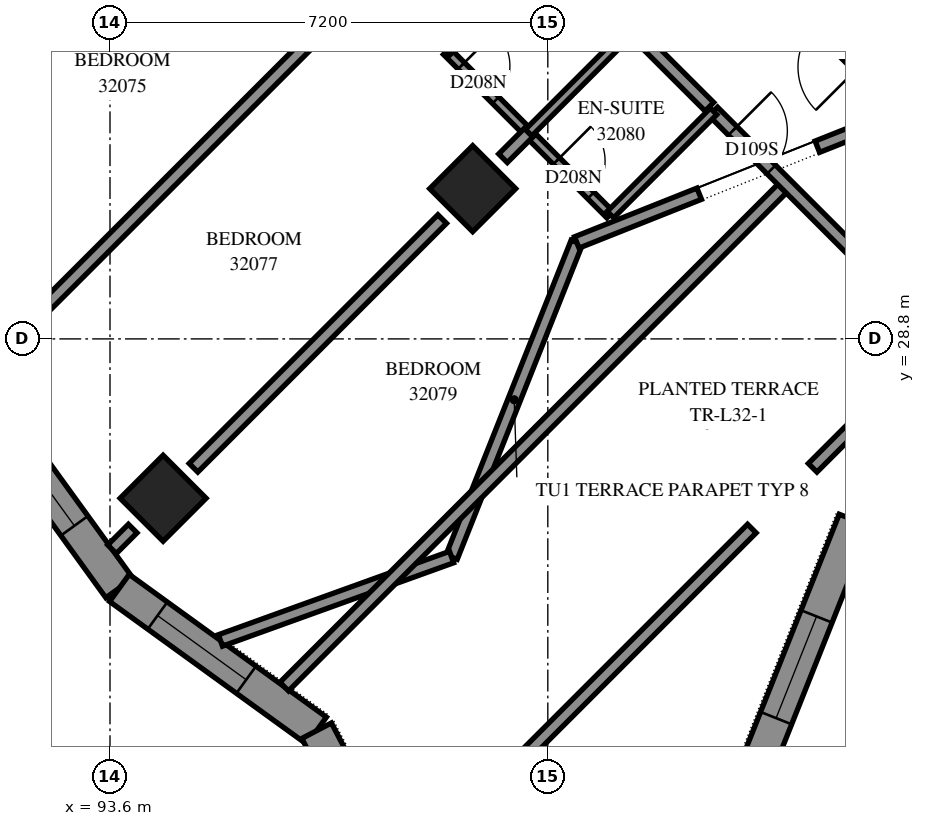
"""IFC4 building model, lengths in metres.
Left out: names, types, materials, properties, quantities, classifications, styles, units other than length and angle.
Written with IfcOpenShell. Run it as: python <this file> out.ifc"""

import sys

from ifc_helpers import new_model, si_unit, direction, frame, frame_2d, origin, origin_2d, place, context, subcontext, project, spatial, polyline, rectangle, outline, extrude, element, fill, save


model = new_model("IFC4")
c1 = context("Model", 3, precision=1e-05, world=origin(), true_north=direction((0.0, 1.0)))
c2 = subcontext(c1, "Body", "Model", "MODEL_VIEW")
j1 = project(units=[si_unit("LENGTHUNIT", "METRE"), si_unit("PLANEANGLEUNIT", "RADIAN")], contexts=[c1])
p1 = place(None, origin())
s1 = spatial("IfcSite", under=j1, at=p1, CompositionType="ELEMENT")
p2 = place(p1, origin())
s2 = spatial("IfcBuilding", under=s1, at=p2, CompositionType="ELEMENT")
p3 = place(p2, frame((0.0, 0.0, 118.6)))
s3 = spatial("IfcBuildingStorey", under=s2, at=p3, CompositionType="ELEMENT", Elevation=118.6)
for number, where, z_axis, x_axis in (
    (1, (99.565, 31.271, 0.0), (0.0, 0.0, 1.0), (0.707, -0.707, 0.0)),
    (2, (94.474, 26.18, 0.0), (0.0, 0.0, 1.0), (0.707, -0.707, 0.0)),
):
    element("IfcColumn", number, at=place(p3, frame(where, z_axis=z_axis, x_axis=x_axis)), inside=s3, PredefinedType="COLUMN", context=c2, shape_type="SweptSolid", body=[
        extrude(rectangle(XDim=1.0, YDim=1.0, at=origin_2d()), origin(), (0.0, 0.0, 1.0), 3.1),
    ])
p4 = place(p3, frame((103.794, 20.653, 0.0), z_axis=(0.0, 0.0, 1.0), x_axis=(0.3696863302, 0.9291566161, 0.0)))
e3 = element("IfcWall", 3, at=p4, inside=s3, PredefinedType="SOLIDWALL", context=c2, shape_type="SweptSolid", body=[
    extrude(outline(polyline([(-0.124, -0.275), (5.437, -0.275), (5.674, 0.275), (0.124, 0.275), (-0.124, -0.275)])), origin(), (0.0, 0.0, 1.0), 3.1),
])
p5 = place(p4, frame((2.057, 0.0, 0.7)))
e4 = element("IfcOpeningElement", 4, at=p5, cuts=e3, PredefinedType="OPENING", context=c2, shape_type="SweptSolid", body=[
    extrude(rectangle(XDim=1.8, YDim=2.0, at=frame_2d((0.9, 1.0))), frame((0.0, 0.285, 0.0), z_axis=(0.0, -1.0, 0.0), x_axis=(1.0, 0.0, 0.0)), (0.0, 0.0, 1.0), 0.57),
])
p6 = place(p3, frame((105.848, 25.815, 0.0), z_axis=(0.0, 0.0, 1.0), x_axis=(0.9291504333, 0.3697018694, 0.0)))
e5 = element("IfcWall", 5, at=p6, inside=s3, PredefinedType="SOLIDWALL", context=c2, shape_type="SweptSolid", body=[
    extrude(outline(polyline([(0.118, -0.275), (5.68, -0.275), (5.432, 0.275), (-0.118, 0.275), (0.118, -0.275)])), origin(), (0.0, 0.0, 1.0), 3.1),
])
p7 = place(p6, frame((0.358, 0.0, 0.7)))
e6 = element("IfcOpeningElement", 6, at=p7, cuts=e5, PredefinedType="OPENING", context=c2, shape_type="SweptSolid", body=[
    extrude(rectangle(XDim=1.8, YDim=2.0, at=frame_2d((0.9, 1.0))), frame((0.0, 0.285, 0.0), z_axis=(0.0, -1.0, 0.0), x_axis=(1.0, 0.0, 0.0)), (0.0, 0.0, 1.0), 0.57),
])
p8 = place(p6, frame((2.874, 0.0, 0.7)))
e7 = element("IfcOpeningElement", 7, at=p8, cuts=e5, PredefinedType="OPENING", context=c2, shape_type="SweptSolid", body=[
    extrude(rectangle(XDim=1.8, YDim=2.0, at=frame_2d((0.9, 1.0))), frame((0.0, 0.285, 0.0), z_axis=(0.0, -1.0, 0.0), x_axis=(1.0, 0.0, 0.0)), (0.0, 0.0, 1.0), 0.57),
])
p9 = place(p3, frame((91.42, 27.93, 0.0), z_axis=(0.0, 0.0, 1.0), x_axis=(0.5863428119, -0.8100630266, 0.0)))
e8 = element("IfcWall", 8, at=p9, inside=s3, PredefinedType="SOLIDWALL", context=c2, shape_type="SweptSolid", body=[
    extrude(outline(polyline([(0.044, -0.275), (4.027, -0.275), (3.939, 0.275), (-0.044, 0.275), (0.044, -0.275)])), origin(), (0.0, 0.0, 1.0), 3.1),
])
p10 = place(p9, frame((0.92, 0.0, 0.7)))
e9 = element("IfcOpeningElement", 9, at=p10, cuts=e8, PredefinedType="OPENING", context=c2, shape_type="SweptSolid", body=[
    extrude(rectangle(XDim=1.8, YDim=2.0, at=frame_2d((0.9, 1.0))), frame((0.0, 0.285, 0.0), z_axis=(0.0, -1.0, 0.0), x_axis=(1.0, 0.0, 0.0)), (0.0, 0.0, 1.0), 0.57),
])
p11 = place(p3, frame((93.755, 24.704, 0.0), z_axis=(0.0, 0.0, 1.0), x_axis=(0.8100529974, -0.5863566673, 0.0)))
e10 = element("IfcWall", 10, at=p11, inside=s3, PredefinedType="SOLIDWALL", context=c2, shape_type="SweptSolid", body=[
    extrude(outline(polyline([(-0.044, -0.275), (3.939, -0.275), (4.068, 0.275), (0.044, 0.275), (-0.044, -0.275)])), origin(), (0.0, 0.0, 1.0), 3.1),
])
p12 = place(p11, frame((0.774, 0.0, 0.7)))
e11 = element("IfcOpeningElement", 11, at=p12, cuts=e10, PredefinedType="OPENING", context=c2, shape_type="SweptSolid", body=[
    extrude(rectangle(XDim=1.8, YDim=2.0, at=frame_2d((0.9, 1.0))), frame((0.0, 0.285, 0.0), z_axis=(0.0, -1.0, 0.0), x_axis=(1.0, 0.0, 0.0)), (0.0, 0.0, 1.0), 0.57),
])
p13 = place(p3, frame((96.998, 22.357, 0.0), z_axis=(0.0, 0.0, 1.0), x_axis=(0.4637843995, -0.8859480971, 0.0)))
e12 = element("IfcWall", 12, at=p13, inside=s3, PredefinedType="SOLIDWALL", context=c2, shape_type="SweptSolid", body=[
    extrude(outline(polyline([(0.065, -0.275), (4.185, -0.275), (3.705, 0.275), (-0.065, 0.275), (0.065, -0.275)])), origin(), (0.0, 0.0, 1.0), 3.1),
])
p14 = place(p13, frame((0.621, 0.0, 0.7)))
e13 = element("IfcOpeningElement", 13, at=p14, cuts=e12, PredefinedType="OPENING", context=c2, shape_type="SweptSolid", body=[
    extrude(rectangle(XDim=1.8, YDim=2.0, at=frame_2d((0.9, 1.0))), frame((0.0, 0.285, 0.0), z_axis=(0.0, -1.0, 0.0), x_axis=(1.0, 0.0, 0.0)), (0.0, 0.0, 1.0), 0.57),
])
p15 = place(p3, frame((101.276, 30.386, 0.0), z_axis=(0.0, 0.0, 1.0), x_axis=(-0.3696934536, -0.9291537819, 0.0)))
e14 = element("IfcWall", 14, at=p15, inside=s3, PredefinedType="PARAPET", context=c2, shape_type="SweptSolid", body=[
    extrude(outline(polyline([(-0.043, -0.1), (5.524, -0.1), (5.614, 0.1), (0.043, 0.1), (-0.043, -0.1)])), origin(), (0.0, 0.0, 1.0), 0.25),
])
p16 = place(p3, frame((99.218, 25.212, 0.0), z_axis=(0.0, 0.0, 1.0), x_axis=(-0.9406904075, -0.3392662042, 0.0)))
e15 = element("IfcWall", 15, at=p16, inside=s3, PredefinedType="PARAPET", context=c2, shape_type="SweptSolid", body=[
    extrude(outline(polyline([(0.045, -0.1), (4.041, -0.1), (4.041, 0.1), (-0.045, 0.1), (0.045, -0.1)])), origin(), (0.0, 0.0, 1.0), 0.25),
])
p17 = place(p3, frame((96.465, 23.082, 0.0), z_axis=(0.0, 0.0, 1.0), x_axis=(0.707016895, 0.7071966559, 0.0)))
e16 = element("IfcWall", 16, at=p17, inside=s3, PredefinedType="PARTITIONING", context=c2, shape_type="SweptSolid", body=[
    extrude(rectangle(XDim=11.682, YDim=0.2, at=frame_2d((5.841, 0.0))), origin(), (0.0, 0.0, 1.0), 3.1),
])
p18 = place(p3, frame((86.329, 33.31, 0.0), z_axis=(0.0, 0.0, 1.0), x_axis=(0.7071067812, 0.7071067812, 0.0)))
e17 = element("IfcWall", 17, at=p18, inside=s3, PredefinedType="PARTITIONING", context=c2, shape_type="SweptSolid", body=[
    extrude(rectangle(XDim=11.617, YDim=0.2, at=frame_2d((5.808, 0.0))), origin(), (0.0, 0.0, 1.0), 3.1),
])
p19 = place(p3, frame((91.45, 28.248, 0.0), z_axis=(0.0, 0.0, 1.0), x_axis=(0.7071931644, 0.7070203875, 0.0)))
e18 = element("IfcWall", 18, at=p19, inside=s3, PredefinedType="PARTITIONING", context=c2, shape_type="SweptSolid", body=[
    extrude(rectangle(XDim=11.576, YDim=0.2, at=frame_2d((5.788, 0.0))), origin(), (0.0, 0.0, 1.0), 3.1),
])
p20 = place(p3, frame((108.831, 30.355, 0.0), z_axis=(0.0, 0.0, 1.0), x_axis=(-0.7073012053, 0.7069123036, 0.0)))
e19 = element("IfcWall", 19, at=p20, inside=s3, PredefinedType="PARTITIONING", context=c2, shape_type="SweptSolid", body=[
    extrude(rectangle(XDim=7.2, YDim=0.2, at=frame_2d((3.6, 0.0))), origin(), (0.0, 0.0, 1.0), 3.1),
])
p21 = place(p20, frame((4.125, 0.0, 0.0)))
e20 = element("IfcOpeningElement", 20, at=p21, cuts=e19, PredefinedType="OPENING", context=c2, shape_type="SweptSolid", body=[
    extrude(rectangle(XDim=1.0, YDim=2.1, at=frame_2d((0.5, 1.05))), frame((0.0, 0.11, 0.0), z_axis=(0.0, -1.0, 0.0), x_axis=(1.0, 0.0, 0.0)), (0.0, 0.0, 1.0), 0.22),
])
p22 = place(p20, frame((0.705, 0.0, 0.0)))
e21 = element("IfcOpeningElement", 21, at=p22, cuts=e19, PredefinedType="OPENING", context=c2, shape_type="SweptSolid", body=[
    extrude(rectangle(XDim=0.9, YDim=2.1, at=frame_2d((0.45, 1.05))), frame((0.0, 0.11, 0.0), z_axis=(0.0, -1.0, 0.0), x_axis=(1.0, 0.0, 0.0)), (0.0, 0.0, 1.0), 0.22),
])
for number, where, z_axis, x_axis in (
    (22, (89.881, 31.771, 0.0), (0.0, 0.0, 1.0), (0.707, 0.707, 0.0)),
    (23, (100.063, 21.589, 0.0), (0.0, 0.0, 1.0), (0.707, 0.707, 0.0)),
):
    element("IfcWall", number, at=place(p3, frame(where, z_axis=z_axis, x_axis=x_axis)), inside=s3, PredefinedType="PARTITIONING", context=c2, shape_type="SweptSolid", body=[
        extrude(rectangle(XDim=5.787, YDim=0.2, at=frame_2d((2.893, 0.0))), origin(), (0.0, 0.0, 1.0), 3.1),
    ])
p23 = place(p3, frame((94.973, 26.681, 0.0), z_axis=(0.0, 0.0, 1.0), x_axis=(0.7071067812, 0.7071067812, 0.0)))
e24 = element("IfcWall", 24, at=p23, inside=s3, PredefinedType="PARTITIONING", context=c2, shape_type="SweptSolid", body=[
    extrude(rectangle(XDim=5.784, YDim=0.2, at=frame_2d((2.892, 0.0))), origin(), (0.0, 0.0, 1.0), 2.6),
])
p24 = place(p3, frame((103.521, 32.541, 0.0), z_axis=(0.0, 0.0, 1.0), x_axis=(0.7071067812, -0.7071067812, 0.0)))
e25 = element("IfcWall", 25, at=p24, inside=s3, PredefinedType="PARTITIONING", context=c2, shape_type="SweptSolid", body=[
    extrude(rectangle(XDim=5.301, YDim=0.2, at=frame_2d((2.65, 0.0))), origin(), (0.0, 0.0, 1.0), 3.1),
])
p25 = place(p24, frame((0.451, 0.0, 0.0)))
e26 = element("IfcOpeningElement", 26, at=p25, cuts=e25, PredefinedType="OPENING", context=c2, shape_type="SweptSolid", body=[
    extrude(rectangle(XDim=0.9, YDim=2.1, at=frame_2d((0.45, 1.05))), frame((0.0, 0.11, 0.0), z_axis=(0.0, -1.0, 0.0), x_axis=(1.0, 0.0, 0.0)), (0.0, 0.0, 1.0), 0.22),
])
p26 = place(p3, frame((99.137, 33.531, 0.0), z_axis=(0.0, 0.0, 1.0), x_axis=(0.7071067812, -0.7071067812, 0.0)))
e27 = element("IfcWall", 27, at=p26, inside=s3, PredefinedType="PARTITIONING", context=c2, shape_type="SweptSolid", body=[
    extrude(rectangle(XDim=3.801, YDim=0.15, at=frame_2d((1.901, 0.0))), origin(), (0.0, 0.0, 1.0), 3.1),
])
p27 = place(p26, frame((0.339, 0.0, 0.0)))
e28 = element("IfcOpeningElement", 28, at=p27, cuts=e27, PredefinedType="OPENING", context=c2, shape_type="SweptSolid", body=[
    extrude(rectangle(XDim=0.8, YDim=2.1, at=frame_2d((0.4, 1.05))), frame((0.0, 0.085, 0.0), z_axis=(0.0, -1.0, 0.0), x_axis=(1.0, 0.0, 0.0)), (0.0, 0.0, 1.0), 0.17),
])
p28 = place(p26, frame((2.553, 0.0, 0.0)))
e29 = element("IfcOpeningElement", 29, at=p28, cuts=e27, PredefinedType="OPENING", context=c2, shape_type="SweptSolid", body=[
    extrude(rectangle(XDim=0.8, YDim=2.1, at=frame_2d((0.4, 1.05))), frame((0.0, 0.085, 0.0), z_axis=(0.0, -1.0, 0.0), x_axis=(1.0, 0.0, 0.0)), (0.0, 0.0, 1.0), 0.17),
])
p29 = place(p3, frame((105.155, 26.681, 0.0), z_axis=(0.0, 0.0, 1.0), x_axis=(0.7071067812, 0.7071067812, 0.0)))
e30 = element("IfcWall", 30, at=p29, inside=s3, PredefinedType="PARTITIONING", context=c2, shape_type="SweptSolid", body=[
    extrude(rectangle(XDim=2.993, YDim=0.2, at=frame_2d((1.496, 0.0))), origin(), (0.0, 0.0, 1.0), 3.1),
])
for number, where, z_axis, x_axis in (
    (31, (99.143, 33.531, 0.0), (0.0, 0.0, 1.0), (0.708, 0.707, 0.0)),
    (32, (101.83, 30.844, 0.0), (0.0, 0.0, 1.0), (0.707, 0.708, 0.0)),
):
    element("IfcWall", number, at=place(p3, frame(where, z_axis=z_axis, x_axis=x_axis)), inside=s3, PredefinedType="PARTITIONING", context=c2, shape_type="SweptSolid", body=[
        extrude(rectangle(XDim=2.4, YDim=0.15, at=frame_2d((1.2, 0.0))), origin(), (0.0, 0.0, 1.0), 3.1),
    ])
p30 = place(p3, frame((100.483, 32.191, 0.0), z_axis=(0.0, 0.0, 1.0), x_axis=(0.7071067812, 0.7071067812, 0.0)))
e33 = element("IfcWall", 33, at=p30, inside=s3, PredefinedType="PARTITIONING", context=c2, shape_type="SweptSolid", body=[
    extrude(rectangle(XDim=2.398, YDim=0.15, at=frame_2d((1.199, 0.0))), origin(), (0.0, 0.0, 1.0), 2.6),
])
p31 = place(p3, frame((102.183, 33.889, 0.0), z_axis=(0.0, 0.0, 1.0), x_axis=(0.7076620277, -0.7065510983, 0.0)))
e34 = element("IfcWall", 34, at=p31, inside=s3, PredefinedType="PARTITIONING", context=c2, shape_type="SweptSolid", body=[
    extrude(rectangle(XDim=1.8, YDim=0.2, at=frame_2d((0.9, 0.0))), origin(), (0.0, 0.0, 1.0), 3.1),
])
p32 = place(p3, frame((100.063, 31.771, 0.0), z_axis=(0.0, 0.0, 1.0), x_axis=(0.7071067812, 0.7071067812, 0.0)))
e35 = element("IfcWall", 35, at=p32, inside=s3, PredefinedType="PARTITIONING", context=c2, shape_type="SweptSolid", body=[
    extrude(rectangle(XDim=0.594, YDim=0.2, at=frame_2d((0.297, 0.0))), origin(), (0.0, 0.0, 1.0), 2.6),
])
p33 = place(p3, frame((93.633, 25.341, 0.0), z_axis=(0.0, 0.0, 1.0), x_axis=(0.7071067812, 0.7071067812, 0.0)))
e36 = element("IfcWall", 36, at=p33, inside=s3, PredefinedType="PARTITIONING", context=c2, shape_type="SweptSolid", body=[
    extrude(rectangle(XDim=0.481, YDim=0.2, at=frame_2d((0.24, 0.0))), origin(), (0.0, 0.0, 1.0), 3.1),
])
p34 = place(p3, frame((106.451, 32.445, 0.0), z_axis=(0.0, 0.0, 1.0), x_axis=(-0.9291537049, -0.369693647, 0.0)))
e37 = element("IfcWall", 37, at=p34, inside=s3, PredefinedType="PARAPET", context=c2, shape_type="SweptSolid", body=[
    extrude(outline(polyline([(0.045, -0.1), (1.311, -0.1), (1.311, 0.1), (-0.045, 0.1), (0.045, -0.1)])), origin(), (0.0, 0.0, 1.0), 0.25),
])
p35 = place(p3, frame((103.29, 31.188, 0.0), z_axis=(0.0, 0.0, 1.0), x_axis=(-0.9291561184, -0.3696875811, 0.0)))
e38 = element("IfcWall", 38, at=p35, inside=s3, PredefinedType="PARAPET", context=c2, shape_type="SweptSolid", body=[
    extrude(outline(polyline([(0.0, -0.1), (2.21, -0.1), (2.124, 0.1), (0.0, 0.1), (0.0, -0.1)])), origin(), (0.0, 0.0, 1.0), 0.25),
])
p36 = place(p5, origin())
e39 = element("IfcWindow", 39, at=p36, inside=s3, PartitioningType="SINGLE_PANEL", PredefinedType="WINDOW", context=c2, shape_type="SweptSolid", body=[
    extrude(rectangle(XDim=1.8, YDim=2.0, at=frame_2d((0.9, 1.0))), frame((0.0, 0.155, 0.0), z_axis=(0.0, -1.0, 0.0), x_axis=(1.0, 0.0, 0.0)), (0.0, 0.0, 1.0), 0.06),
])
fill(e4, e39)
p37 = place(p10, origin())
e40 = element("IfcWindow", 40, at=p37, inside=s3, PartitioningType="SINGLE_PANEL", PredefinedType="WINDOW", context=c2, shape_type="SweptSolid", body=[
    extrude(rectangle(XDim=1.8, YDim=2.0, at=frame_2d((0.9, 1.0))), frame((0.0, 0.155, 0.0), z_axis=(0.0, -1.0, 0.0), x_axis=(1.0, 0.0, 0.0)), (0.0, 0.0, 1.0), 0.06),
])
fill(e9, e40)
p38 = place(p12, origin())
e41 = element("IfcWindow", 41, at=p38, inside=s3, PartitioningType="SINGLE_PANEL", PredefinedType="WINDOW", context=c2, shape_type="SweptSolid", body=[
    extrude(rectangle(XDim=1.8, YDim=2.0, at=frame_2d((0.9, 1.0))), frame((0.0, 0.155, 0.0), z_axis=(0.0, -1.0, 0.0), x_axis=(1.0, 0.0, 0.0)), (0.0, 0.0, 1.0), 0.06),
])
fill(e11, e41)
p39 = place(p21, origin())
e42 = element("IfcDoor", 42, at=p39, inside=s3, OperationType="SINGLE_SWING_LEFT", PredefinedType="DOOR", context=c2, shape_type="SweptSolid", body=[
    extrude(rectangle(XDim=1.0, YDim=2.1, at=frame_2d((0.5, 1.05))), frame((0.0, 0.025, 0.0), z_axis=(0.0, -1.0, 0.0), x_axis=(1.0, 0.0, 0.0)), (0.0, 0.0, 1.0), 0.05),
])
fill(e20, e42)
p40 = place(p27, origin())
e43 = element("IfcDoor", 43, at=p40, inside=s3, OperationType="SINGLE_SWING_RIGHT", PredefinedType="DOOR", context=c2, shape_type="SweptSolid", body=[
    extrude(rectangle(XDim=0.8, YDim=2.1, at=frame_2d((0.4, 1.05))), frame((0.0, 0.025, 0.0), z_axis=(0.0, -1.0, 0.0), x_axis=(1.0, 0.0, 0.0)), (0.0, 0.0, 1.0), 0.05),
])
fill(e28, e43)
p41 = place(p25, origin())
e44 = element("IfcDoor", 44, at=p41, inside=s3, OperationType="SINGLE_SWING_RIGHT", PredefinedType="DOOR", context=c2, shape_type="SweptSolid", body=[
    extrude(rectangle(XDim=0.9, YDim=2.1, at=frame_2d((0.45, 1.05))), frame((0.0, 0.025, 0.0), z_axis=(0.0, -1.0, 0.0), x_axis=(1.0, 0.0, 0.0)), (0.0, 0.0, 1.0), 0.05),
])
fill(e26, e44)
p42 = place(p28, origin())
e45 = element("IfcDoor", 45, at=p42, inside=s3, OperationType="SINGLE_SWING_RIGHT", PredefinedType="DOOR", context=c2, shape_type="SweptSolid", body=[
    extrude(rectangle(XDim=0.8, YDim=2.1, at=frame_2d((0.4, 1.05))), frame((0.0, 0.025, 0.0), z_axis=(0.0, -1.0, 0.0), x_axis=(1.0, 0.0, 0.0)), (0.0, 0.0, 1.0), 0.05),
])
fill(e29, e45)
save(model, sys.argv[1])
